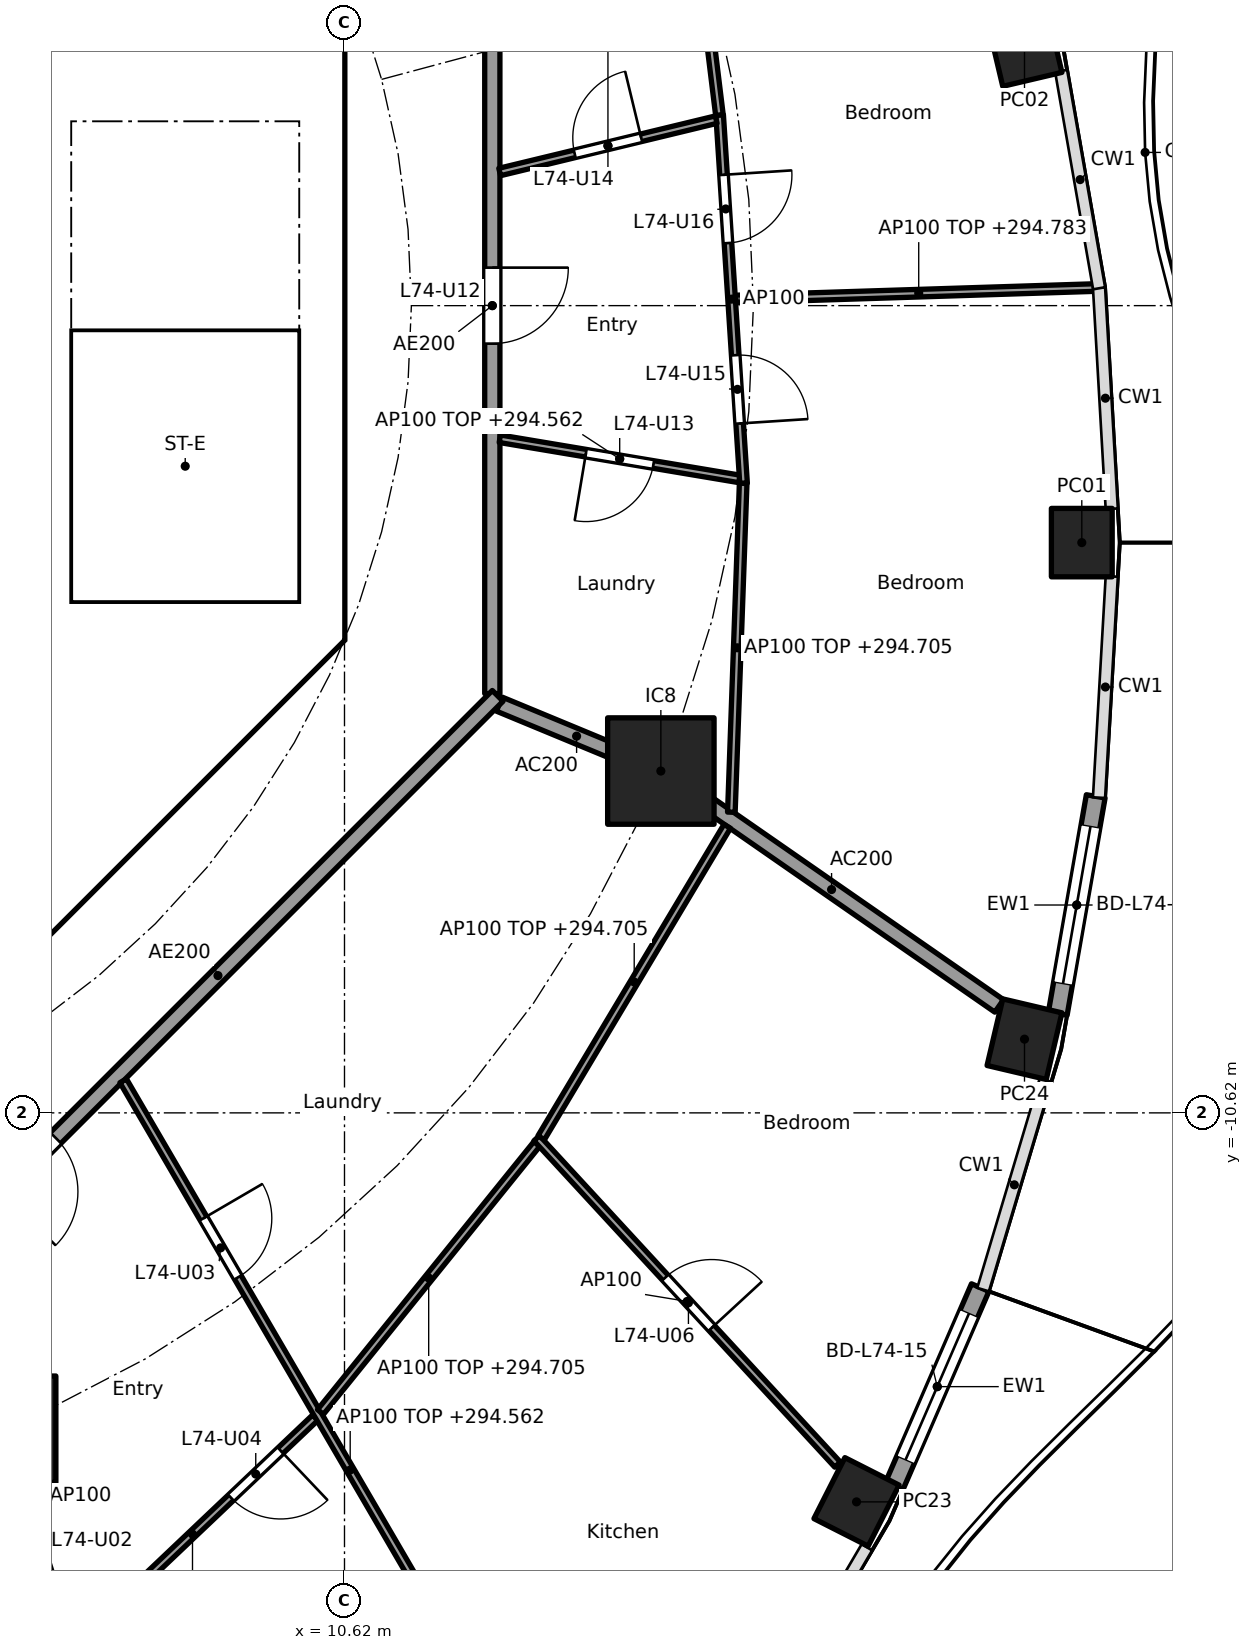
"""IFC4 building model, lengths in metres.
Left out: names, types, materials, properties, quantities, classifications, styles, units other than length and angle.
Written with IfcOpenShell. Run it as: python <this file> out.ifc"""

import sys

from ifc_helpers import new_model, si_unit, direction, frame, frame_2d, origin, origin_2d, place, context, subcontext, project, spatial, polyline, rectangle, hollow_rectangle, outline, extrude, element, fill, save


model = new_model("IFC4")
c1 = context("Model", 3, precision=1e-05, world=origin(), true_north=direction((0.0, 1.0)))
c2 = subcontext(c1, "Body", "Model", "MODEL_VIEW")
j1 = project(units=[si_unit("LENGTHUNIT", "METRE"), si_unit("PLANEANGLEUNIT", "RADIAN")], contexts=[c1])
p1 = place(None, origin())
s1 = spatial("IfcSite", under=j1, at=p1, CompositionType="ELEMENT")
p2 = place(p1, origin())
s2 = spatial("IfcBuilding", under=s1, at=p2, CompositionType="ELEMENT")
p3 = place(p2, frame((0.0, 0.0, 291.8)))
s3 = spatial("IfcBuildingStorey", under=s2, at=p3, CompositionType="ELEMENT", Elevation=291.8)
for number, where, z_axis, x_axis in (
    (1, (20.32, -3.118, 0.0), (0.0, 0.0, 1.0), (0.0, 1.0, 0.0)),
    (2, (19.566, 3.415, 0.0), (0.0, 0.0, 1.0), (-0.229, 0.973, 0.0)),
    (3, (17.356, -15.738, 0.0), (0.0, 0.0, 1.0), (0.452, 0.892, 0.0)),
    (4, (19.566, -9.65, 0.0), (0.0, 0.0, 1.0), (0.229, 0.973, 0.0)),
):
    element("IfcColumn", number, at=place(p3, frame(where, z_axis=z_axis, x_axis=x_axis)), inside=s3, PredefinedType="COLUMN", context=c2, shape_type="SweptSolid", body=[
        extrude(hollow_rectangle(XDim=0.9, YDim=0.8, WallThickness=0.028, at=origin_2d()), origin(), (0.0, 0.0, 1.0), 3.7),
    ])
for number, where, z_axis, x_axis in (
    (5, (6.123, -14.782, 0.0), (0.0, 0.0, 1.0), (1.0, 0.0, 0.0)),
    (6, (14.782, -6.123, 0.0), (0.0, 0.0, 1.0), (1.0, 0.0, 0.0)),
):
    element("IfcColumn", number, at=place(p3, frame(where, z_axis=z_axis, x_axis=x_axis)), inside=s3, PredefinedType="COLUMN", context=c2, shape_type="SweptSolid", body=[
        extrude(rectangle(XDim=1.4, YDim=1.4, at=origin_2d()), origin(), (0.0, 0.0, 1.0), 3.7),
    ])
p4 = place(p3, frame((18.983, -12.918, 0.0), z_axis=(0.0, 0.0, 1.0), x_axis=(-0.397597791596, -0.9175598052, 0.0)))
e7 = element("IfcWall", 7, at=p4, inside=s3, PredefinedType="SOLIDWALL", context=c2, shape_type="SweptSolid", body=[
    extrude(rectangle(XDim=2.841, YDim=0.25, at=frame_2d((1.42, 0.0))), origin(), (0.0, 0.0, 1.0), 3.44),
])
p5 = place(p4, frame((0.371, 0.0, 0.0)))
e8 = element("IfcOpeningElement", 8, at=p5, cuts=e7, PredefinedType="OPENING", context=c2, shape_type="SweptSolid", body=[
    extrude(rectangle(XDim=2.1, YDim=2.4, at=frame_2d((1.05, 1.2))), frame((0.0, 0.135, 0.0), z_axis=(0.0, -1.0, 0.0), x_axis=(1.0, 0.0, 0.0)), (0.0, 0.0, 1.0), 0.27),
])
p6 = place(p3, frame((20.503, -6.456, 0.0), z_axis=(0.0, 0.0, 1.0), x_axis=(-0.172182411767, -0.985065082661, 0.0)))
e9 = element("IfcWall", 9, at=p6, inside=s3, PredefinedType="SOLIDWALL", context=c2, shape_type="SweptSolid", body=[
    extrude(rectangle(XDim=2.903, YDim=0.25, at=frame_2d((1.451, 0.0))), origin(), (0.0, 0.0, 1.0), 3.44),
])
p7 = place(p6, frame((0.401, 0.0, 0.0)))
e10 = element("IfcOpeningElement", 10, at=p7, cuts=e9, PredefinedType="OPENING", context=c2, shape_type="SweptSolid", body=[
    extrude(rectangle(XDim=2.1, YDim=2.4, at=frame_2d((1.05, 1.2))), frame((0.0, 0.135, 0.0), z_axis=(0.0, -1.0, 0.0), x_axis=(1.0, 0.0, 0.0)), (0.0, 0.0, 1.0), 0.27),
])
p8 = place(p3, frame((4.613, -9.988, 0.0), z_axis=(0.0, 0.0, 1.0), x_axis=(0.707106781187, 0.707106781187, 0.0)))
e11 = element("IfcWall", 11, at=p8, inside=s3, PredefinedType="SHEAR", context=c2, shape_type="SweptSolid", body=[
    extrude(rectangle(XDim=7.602, YDim=0.6, at=frame_2d((3.801, 0.0))), origin(), (0.0, 0.0, 1.0), 3.44),
])
p9 = place(p8, frame((3.201, 0.0, 0.0)))
e12 = element("IfcOpeningElement", 12, at=p9, cuts=e11, PredefinedType="OPENING", context=c2, shape_type="SweptSolid", body=[
    extrude(rectangle(XDim=1.2, YDim=2.1, at=frame_2d((0.6, 1.05))), frame((0.0, 0.31, 0.0), z_axis=(0.0, -1.0, 0.0), x_axis=(1.0, 0.0, 0.0)), (0.0, 0.0, 1.0), 0.62),
])
p10 = place(p3, origin())
e13 = element("IfcWall", 13, at=p10, inside=s3, PredefinedType="SHEAR", context=c2, shape_type="SweptSolid", body=[
    extrude(outline(polyline([(9.776, -4.401), (10.025, -4.152), (10.025, -3.801), (10.025, 4.152), (9.776, 4.401), (10.2, 4.825), (10.625, 4.401), (10.625, -4.401), (10.2, -4.825), (9.776, -4.401)])), origin(), (0.0, 0.0, 1.0), 3.44),
])
p11 = place(p3, origin())
e14 = element("IfcWall", 14, at=p11, inside=s3, PredefinedType="SOLIDWALL", context=c2, shape_type="SweptSolid", body=[
    extrude(outline(polyline([(7.025, -3.9), (6.7, -3.9), (6.7, 3.9), (7.025, 3.9), (7.025, -3.9)])), origin(), (0.0, 0.0, 1.0), 3.44),
])
p12 = place(p3, origin())
e15 = element("IfcWall", 15, at=p12, inside=s3, PredefinedType="SOLIDWALL", context=c2, shape_type="SweptSolid", body=[
    extrude(outline(polyline([(10.025, -4.1), (6.7, -4.1), (6.7, -3.9), (10.025, -3.9), (10.025, -4.1)])), origin(), (0.0, 0.0, 1.0), 3.44),
])
p13 = place(p3, frame((12.657, -5.243, 0.0), z_axis=(0.0, 0.0, 1.0), x_axis=(0.92383017907, -0.382802560388, 0.0)))
e16 = element("IfcWall", 16, at=p13, inside=s3, PredefinedType="PARTITIONING", context=c2, shape_type="SweptSolid", body=[
    extrude(rectangle(XDim=2.2, YDim=0.2, at=frame_2d((1.1, 0.0))), origin(), (0.0, 0.0, 1.0), 3.44),
])
p14 = place(p3, frame((14.823, -6.151, 0.0), z_axis=(0.0, 0.0, 1.0), x_axis=(0.821435065081, -0.570302054928, 0.0)))
e17 = element("IfcWall", 17, at=p14, inside=s3, PredefinedType="PARTITIONING", context=c2, shape_type="SweptSolid", body=[
    extrude(rectangle(XDim=5.368, YDim=0.2, at=frame_2d((2.684, 0.0))), origin(), (0.0, 0.0, 1.0), 3.44),
])
p15 = place(p3, frame((12.565, -5.104, 0.0), z_axis=(0.0, 0.0, 1.0), x_axis=(0.0, 1.0, 0.0)))
e18 = element("IfcWall", 18, at=p15, inside=s3, PredefinedType="PARTITIONING", context=c2, shape_type="SweptSolid", body=[
    extrude(rectangle(XDim=10.209, YDim=0.2, at=frame_2d((5.104, 0.0))), origin(), (0.0, 0.0, 1.0), 3.44),
])
p16 = place(p15, frame((4.604, 0.0, 0.0)))
e19 = element("IfcOpeningElement", 19, at=p16, cuts=e18, PredefinedType="OPENING", context=c2, shape_type="SweptSolid", body=[
    extrude(rectangle(XDim=1.0, YDim=2.1, at=frame_2d((0.5, 1.05))), frame((0.0, 0.11, 0.0), z_axis=(0.0, -1.0, 0.0), x_axis=(1.0, 0.0, 0.0)), (0.0, 0.0, 1.0), 0.22),
])
p17 = place(p3, frame((5.275, -12.494, 0.0), z_axis=(0.0, 0.0, 1.0), x_axis=(0.707106781187, 0.707106781187, 0.0)))
e20 = element("IfcWall", 20, at=p17, inside=s3, PredefinedType="PARTITIONING", context=c2, shape_type="SweptSolid", body=[
    extrude(rectangle(XDim=10.409, YDim=0.2, at=frame_2d((5.205, 0.0))), origin(), (0.0, 0.0, 1.0), 3.44),
])
p18 = place(p17, frame((1.185, 0.0, 0.0)))
e21 = element("IfcOpeningElement", 21, at=p18, cuts=e20, PredefinedType="OPENING", context=c2, shape_type="SweptSolid", body=[
    extrude(rectangle(XDim=1.0, YDim=2.1, at=frame_2d((0.5, 1.05))), frame((0.0, 0.11, 0.0), z_axis=(0.0, -1.0, 0.0), x_axis=(1.0, 0.0, 0.0)), (0.0, 0.0, 1.0), 0.22),
])
p19 = place(p3, frame((12.663, -1.751, 0.0), z_axis=(0.0, 0.0, 1.0), x_axis=(0.98626156497, -0.165191178529, 0.0)))
e22 = element("IfcWall", 22, at=p19, inside=s3, PredefinedType="PARTITIONING", context=c2, shape_type="SweptSolid", body=[
    extrude(rectangle(XDim=3.198, YDim=0.1, at=frame_2d((1.599, 0.0))), origin(), (0.0, 0.0, 1.0), 2.762),
])
p20 = place(p19, frame((1.149, 0.0, 0.0)))
e23 = element("IfcOpeningElement", 23, at=p20, cuts=e22, PredefinedType="OPENING", context=c2, shape_type="SweptSolid", body=[
    extrude(rectangle(XDim=0.9, YDim=2.1, at=frame_2d((0.45, 1.05))), frame((0.0, 0.06, 0.0), z_axis=(0.0, -1.0, 0.0), x_axis=(1.0, 0.0, 0.0)), (0.0, 0.0, 1.0), 0.12),
])
p21 = place(p3, frame((15.87, -2.338, 0.0), z_axis=(0.0, 0.0, 1.0), x_axis=(-0.064797294757, 0.997898447034, 0.0)))
e24 = element("IfcWall", 24, at=p21, inside=s3, PredefinedType="PARTITIONING", context=c2, shape_type="SweptSolid", body=[
    extrude(rectangle(XDim=4.857, YDim=0.1, at=frame_2d((2.428, 0.0))), origin(), (0.0, 0.0, 1.0), 3.44),
])
p22 = place(p21, frame((0.789, 0.0, 0.0)))
e25 = element("IfcOpeningElement", 25, at=p22, cuts=e24, PredefinedType="OPENING", context=c2, shape_type="SweptSolid", body=[
    extrude(rectangle(XDim=0.9, YDim=2.1, at=frame_2d((0.45, 1.05))), frame((0.0, 0.06, 0.0), z_axis=(0.0, -1.0, 0.0), x_axis=(1.0, 0.0, 0.0)), (0.0, 0.0, 1.0), 0.12),
])
p23 = place(p21, frame((3.167, 0.0, 0.0)))
e26 = element("IfcOpeningElement", 26, at=p23, cuts=e24, PredefinedType="OPENING", context=c2, shape_type="SweptSolid", body=[
    extrude(rectangle(XDim=0.9, YDim=2.1, at=frame_2d((0.45, 1.05))), frame((0.0, 0.06, 0.0), z_axis=(0.0, -1.0, 0.0), x_axis=(1.0, 0.0, 0.0)), (0.0, 0.0, 1.0), 0.12),
])
p24 = place(p3, frame((15.865, -2.338, 0.0), z_axis=(0.0, 0.0, 1.0), x_axis=(-0.035864509465, -0.999356661538, 0.0)))
e27 = element("IfcWall", 27, at=p24, inside=s3, PredefinedType="PARTITIONING", context=c2, shape_type="SweptSolid", body=[
    extrude(rectangle(XDim=4.329, YDim=0.1, at=frame_2d((2.165, 0.0))), origin(), (0.0, 0.0, 1.0), 2.905),
])
p25 = place(p3, frame((15.763, 0.087, 0.0), z_axis=(0.0, 0.0, 1.0), x_axis=(0.999492034598, 0.03186962151, 0.0)))
e28 = element("IfcWall", 28, at=p25, inside=s3, PredefinedType="PARTITIONING", context=c2, shape_type="SweptSolid", body=[
    extrude(rectangle(XDim=4.826, YDim=0.1, at=frame_2d((2.413, 0.0))), origin(), (0.0, 0.0, 1.0), 2.983),
])
p26 = place(p3, frame((12.662, 1.758, 0.0), z_axis=(0.0, 0.0, 1.0), x_axis=(0.972004827836, 0.234960879007, 0.0)))
e29 = element("IfcWall", 29, at=p26, inside=s3, PredefinedType="PARTITIONING", context=c2, shape_type="SweptSolid", body=[
    extrude(rectangle(XDim=2.93, YDim=0.1, at=frame_2d((1.465, 0.0))), origin(), (0.0, 0.0, 1.0), 2.762),
])
p27 = place(p26, frame((1.015, 0.0, 0.0)))
e30 = element("IfcOpeningElement", 30, at=p27, cuts=e29, PredefinedType="OPENING", context=c2, shape_type="SweptSolid", body=[
    extrude(rectangle(XDim=0.9, YDim=2.1, at=frame_2d((0.45, 1.05))), frame((0.0, 0.06, 0.0), z_axis=(0.0, -1.0, 0.0), x_axis=(1.0, 0.0, 0.0)), (0.0, 0.0, 1.0), 0.12),
])
p28 = place(p3, frame((15.552, 2.508, 0.0), z_axis=(0.0, 0.0, 1.0), x_axis=(-0.12196631785, 0.992534239868, 0.0)))
e31 = element("IfcWall", 31, at=p28, inside=s3, PredefinedType="PARTITIONING", context=c2, shape_type="SweptSolid", body=[
    extrude(rectangle(XDim=3.937, YDim=0.1, at=frame_2d((1.969, 0.0))), origin(), (0.0, 0.0, 1.0), 2.905),
])
p29 = place(p3, frame((6.138, -14.83, 0.0), z_axis=(0.0, 0.0, 1.0), x_axis=(0.303665801704, -0.952778610631, 0.0)))
e32 = element("IfcWall", 32, at=p29, inside=s3, PredefinedType="PARTITIONING", context=c2, shape_type="SweptSolid", body=[
    extrude(rectangle(XDim=2.922, YDim=0.1, at=frame_2d((1.461, 0.0))), origin(), (0.0, 0.0, 1.0), 3.44),
])
p30 = place(p29, frame((1.407, 0.0, 0.0)))
e33 = element("IfcOpeningElement", 33, at=p30, cuts=e32, PredefinedType="OPENING", context=c2, shape_type="SweptSolid", body=[
    extrude(rectangle(XDim=0.9, YDim=2.1, at=frame_2d((0.45, 1.05))), frame((0.0, 0.06, 0.0), z_axis=(0.0, -1.0, 0.0), x_axis=(1.0, 0.0, 0.0)), (0.0, 0.0, 1.0), 0.12),
])
p31 = place(p3, frame((7.004, -17.695, 0.0), z_axis=(0.0, 0.0, 1.0), x_axis=(0.725438442765, 0.68828705186, 0.0)))
e34 = element("IfcWall", 34, at=p31, inside=s3, PredefinedType="PARTITIONING", context=c2, shape_type="SweptSolid", body=[
    extrude(rectangle(XDim=4.456, YDim=0.1, at=frame_2d((2.228, 0.0))), origin(), (0.0, 0.0, 1.0), 2.905),
])
p32 = place(p31, frame((2.925, 0.0, 0.0)))
e35 = element("IfcOpeningElement", 35, at=p32, cuts=e34, PredefinedType="OPENING", context=c2, shape_type="SweptSolid", body=[
    extrude(rectangle(XDim=0.9, YDim=2.1, at=frame_2d((0.45, 1.05))), frame((0.0, 0.06, 0.0), z_axis=(0.0, -1.0, 0.0), x_axis=(1.0, 0.0, 0.0)), (0.0, 0.0, 1.0), 0.12),
])
p33 = place(p3, frame((7.708, -10.198, 0.0), z_axis=(0.0, 0.0, 1.0), x_axis=(0.503839015963, -0.863797572347, 0.0)))
e36 = element("IfcWall", 36, at=p33, inside=s3, PredefinedType="PARTITIONING", context=c2, shape_type="SweptSolid", body=[
    extrude(rectangle(XDim=11.856, YDim=0.1, at=frame_2d((5.928, 0.0))), origin(), (0.0, 0.0, 1.0), 2.762),
])
p34 = place(p33, frame((2.095, 0.0, 0.0)))
e37 = element("IfcOpeningElement", 37, at=p34, cuts=e36, PredefinedType="OPENING", context=c2, shape_type="SweptSolid", body=[
    extrude(rectangle(XDim=0.9, YDim=2.1, at=frame_2d((0.45, 1.05))), frame((0.0, 0.06, 0.0), z_axis=(0.0, -1.0, 0.0), x_axis=(1.0, 0.0, 0.0)), (0.0, 0.0, 1.0), 0.12),
])
p35 = place(p33, frame((8.023, 0.0, 0.0)))
e38 = element("IfcOpeningElement", 38, at=p35, cuts=e36, PredefinedType="OPENING", context=c2, shape_type="SweptSolid", body=[
    extrude(rectangle(XDim=0.9, YDim=2.1, at=frame_2d((0.45, 1.05))), frame((0.0, 0.06, 0.0), z_axis=(0.0, -1.0, 0.0), x_axis=(1.0, 0.0, 0.0)), (0.0, 0.0, 1.0), 0.12),
])
p36 = place(p3, frame((10.304, -14.555, 0.0), z_axis=(0.0, 0.0, 1.0), x_axis=(0.628170338674, 0.778075848237, 0.0)))
e39 = element("IfcWall", 39, at=p36, inside=s3, PredefinedType="PARTITIONING", context=c2, shape_type="SweptSolid", body=[
    extrude(rectangle(XDim=4.532, YDim=0.1, at=frame_2d((2.266, 0.0))), origin(), (0.0, 0.0, 1.0), 2.905),
])
p37 = place(p3, frame((13.149, -10.953, 0.0), z_axis=(0.0, 0.0, 1.0), x_axis=(0.677762562884, -0.735280836384, 0.0)))
e40 = element("IfcWall", 40, at=p37, inside=s3, PredefinedType="PARTITIONING", context=c2, shape_type="SweptSolid", body=[
    extrude(rectangle(XDim=5.841, YDim=0.1, at=frame_2d((2.92, 0.0))), origin(), (0.0, 0.0, 1.0), 3.44),
])
p38 = place(p37, frame((2.495, 0.0, 0.0)))
e41 = element("IfcOpeningElement", 41, at=p38, cuts=e40, PredefinedType="OPENING", context=c2, shape_type="SweptSolid", body=[
    extrude(rectangle(XDim=0.9, YDim=2.1, at=frame_2d((0.45, 1.05))), frame((0.0, 0.06, 0.0), z_axis=(0.0, -1.0, 0.0), x_axis=(1.0, 0.0, 0.0)), (0.0, 0.0, 1.0), 0.12),
])
p39 = place(p3, frame((13.208, -10.947, 0.0), z_axis=(0.0, 0.0, 1.0), x_axis=(0.512726452516, 0.858552028063, 0.0)))
e42 = element("IfcWall", 42, at=p39, inside=s3, PredefinedType="PARTITIONING", context=c2, shape_type="SweptSolid", body=[
    extrude(rectangle(XDim=4.772, YDim=0.1, at=frame_2d((2.386, 0.0))), origin(), (0.0, 0.0, 1.0), 2.905),
])
p40 = place(p5, origin())
e43 = element("IfcDoor", 43, at=p40, inside=s3, OperationType="SLIDING_TO_LEFT", PredefinedType="DOOR", context=c2, shape_type="SweptSolid", body=[
    extrude(rectangle(XDim=2.1, YDim=2.4, at=frame_2d((1.05, 1.2))), frame((0.0, 0.025, 0.0), z_axis=(0.0, -1.0, 0.0), x_axis=(1.0, 0.0, 0.0)), (0.0, 0.0, 1.0), 0.05),
])
fill(e8, e43)
p41 = place(p7, origin())
e44 = element("IfcDoor", 44, at=p41, inside=s3, OperationType="SLIDING_TO_LEFT", PredefinedType="DOOR", context=c2, shape_type="SweptSolid", body=[
    extrude(rectangle(XDim=2.1, YDim=2.4, at=frame_2d((1.05, 1.2))), frame((0.0, 0.025, 0.0), z_axis=(0.0, -1.0, 0.0), x_axis=(1.0, 0.0, 0.0)), (0.0, 0.0, 1.0), 0.05),
])
fill(e10, e44)
p42 = place(p9, origin())
e45 = element("IfcDoor", 45, at=p42, inside=s3, OperationType="SINGLE_SWING_RIGHT", PredefinedType="DOOR", context=c2, shape_type="SweptSolid", body=[
    extrude(rectangle(XDim=1.2, YDim=2.1, at=frame_2d((0.6, 1.05))), frame((0.0, 0.025, 0.0), z_axis=(0.0, -1.0, 0.0), x_axis=(1.0, 0.0, 0.0)), (0.0, 0.0, 1.0), 0.05),
])
fill(e12, e45)
p43 = place(p18, frame((1.0, 0.0, 0.0), x_axis=(-1.0, 0.0, 0.0)))
e46 = element("IfcDoor", 46, at=p43, inside=s3, OperationType="SINGLE_SWING_RIGHT", PredefinedType="DOOR", context=c2, shape_type="SweptSolid", body=[
    extrude(rectangle(XDim=1.0, YDim=2.1, at=frame_2d((0.5, 1.05))), frame((0.0, 0.025, 0.0), z_axis=(0.0, -1.0, 0.0), x_axis=(1.0, 0.0, 0.0)), (0.0, 0.0, 1.0), 0.05),
])
fill(e21, e46)
p44 = place(p30, frame((0.9, 0.0, 0.0), x_axis=(-1.0, 0.0, 0.0)))
e47 = element("IfcDoor", 47, at=p44, inside=s3, OperationType="SINGLE_SWING_LEFT", PredefinedType="DOOR", context=c2, shape_type="SweptSolid", body=[
    extrude(rectangle(XDim=0.9, YDim=2.1, at=frame_2d((0.45, 1.05))), frame((0.0, 0.025, 0.0), z_axis=(0.0, -1.0, 0.0), x_axis=(1.0, 0.0, 0.0)), (0.0, 0.0, 1.0), 0.05),
])
fill(e33, e47)
p45 = place(p34, origin())
e48 = element("IfcDoor", 48, at=p45, inside=s3, OperationType="SINGLE_SWING_LEFT", PredefinedType="DOOR", context=c2, shape_type="SweptSolid", body=[
    extrude(rectangle(XDim=0.9, YDim=2.1, at=frame_2d((0.45, 1.05))), frame((0.0, 0.025, 0.0), z_axis=(0.0, -1.0, 0.0), x_axis=(1.0, 0.0, 0.0)), (0.0, 0.0, 1.0), 0.05),
])
fill(e37, e48)
p46 = place(p32, frame((0.9, 0.0, 0.0), x_axis=(-1.0, 0.0, 0.0)))
e49 = element("IfcDoor", 49, at=p46, inside=s3, OperationType="SINGLE_SWING_LEFT", PredefinedType="DOOR", context=c2, shape_type="SweptSolid", body=[
    extrude(rectangle(XDim=0.9, YDim=2.1, at=frame_2d((0.45, 1.05))), frame((0.0, 0.025, 0.0), z_axis=(0.0, -1.0, 0.0), x_axis=(1.0, 0.0, 0.0)), (0.0, 0.0, 1.0), 0.05),
])
fill(e35, e49)
p47 = place(p38, origin())
e50 = element("IfcDoor", 50, at=p47, inside=s3, OperationType="SINGLE_SWING_RIGHT", PredefinedType="DOOR", context=c2, shape_type="SweptSolid", body=[
    extrude(rectangle(XDim=0.9, YDim=2.1, at=frame_2d((0.45, 1.05))), frame((0.0, 0.025, 0.0), z_axis=(0.0, -1.0, 0.0), x_axis=(1.0, 0.0, 0.0)), (0.0, 0.0, 1.0), 0.05),
])
fill(e41, e50)
p48 = place(p16, frame((1.0, 0.0, 0.0), x_axis=(-1.0, 0.0, 0.0)))
e51 = element("IfcDoor", 51, at=p48, inside=s3, OperationType="SINGLE_SWING_LEFT", PredefinedType="DOOR", context=c2, shape_type="SweptSolid", body=[
    extrude(rectangle(XDim=1.0, YDim=2.1, at=frame_2d((0.5, 1.05))), frame((0.0, 0.025, 0.0), z_axis=(0.0, -1.0, 0.0), x_axis=(1.0, 0.0, 0.0)), (0.0, 0.0, 1.0), 0.05),
])
fill(e19, e51)
p49 = place(p20, frame((0.9, 0.0, 0.0), x_axis=(-1.0, 0.0, 0.0)))
e52 = element("IfcDoor", 52, at=p49, inside=s3, OperationType="SINGLE_SWING_RIGHT", PredefinedType="DOOR", context=c2, shape_type="SweptSolid", body=[
    extrude(rectangle(XDim=0.9, YDim=2.1, at=frame_2d((0.45, 1.05))), frame((0.0, 0.025, 0.0), z_axis=(0.0, -1.0, 0.0), x_axis=(1.0, 0.0, 0.0)), (0.0, 0.0, 1.0), 0.05),
])
fill(e23, e52)
p50 = place(p27, origin())
e53 = element("IfcDoor", 53, at=p50, inside=s3, OperationType="SINGLE_SWING_RIGHT", PredefinedType="DOOR", context=c2, shape_type="SweptSolid", body=[
    extrude(rectangle(XDim=0.9, YDim=2.1, at=frame_2d((0.45, 1.05))), frame((0.0, 0.025, 0.0), z_axis=(0.0, -1.0, 0.0), x_axis=(1.0, 0.0, 0.0)), (0.0, 0.0, 1.0), 0.05),
])
fill(e30, e53)
p51 = place(p22, frame((0.9, 0.0, 0.0), x_axis=(-1.0, 0.0, 0.0)))
e54 = element("IfcDoor", 54, at=p51, inside=s3, OperationType="SINGLE_SWING_RIGHT", PredefinedType="DOOR", context=c2, shape_type="SweptSolid", body=[
    extrude(rectangle(XDim=0.9, YDim=2.1, at=frame_2d((0.45, 1.05))), frame((0.0, 0.025, 0.0), z_axis=(0.0, -1.0, 0.0), x_axis=(1.0, 0.0, 0.0)), (0.0, 0.0, 1.0), 0.05),
])
fill(e25, e54)
p52 = place(p23, frame((0.9, 0.0, 0.0), x_axis=(-1.0, 0.0, 0.0)))
e55 = element("IfcDoor", 55, at=p52, inside=s3, OperationType="SINGLE_SWING_LEFT", PredefinedType="DOOR", context=c2, shape_type="SweptSolid", body=[
    extrude(rectangle(XDim=0.9, YDim=2.1, at=frame_2d((0.45, 1.05))), frame((0.0, 0.025, 0.0), z_axis=(0.0, -1.0, 0.0), x_axis=(1.0, 0.0, 0.0)), (0.0, 0.0, 1.0), 0.05),
])
fill(e26, e55)
save(model, sys.argv[1])
